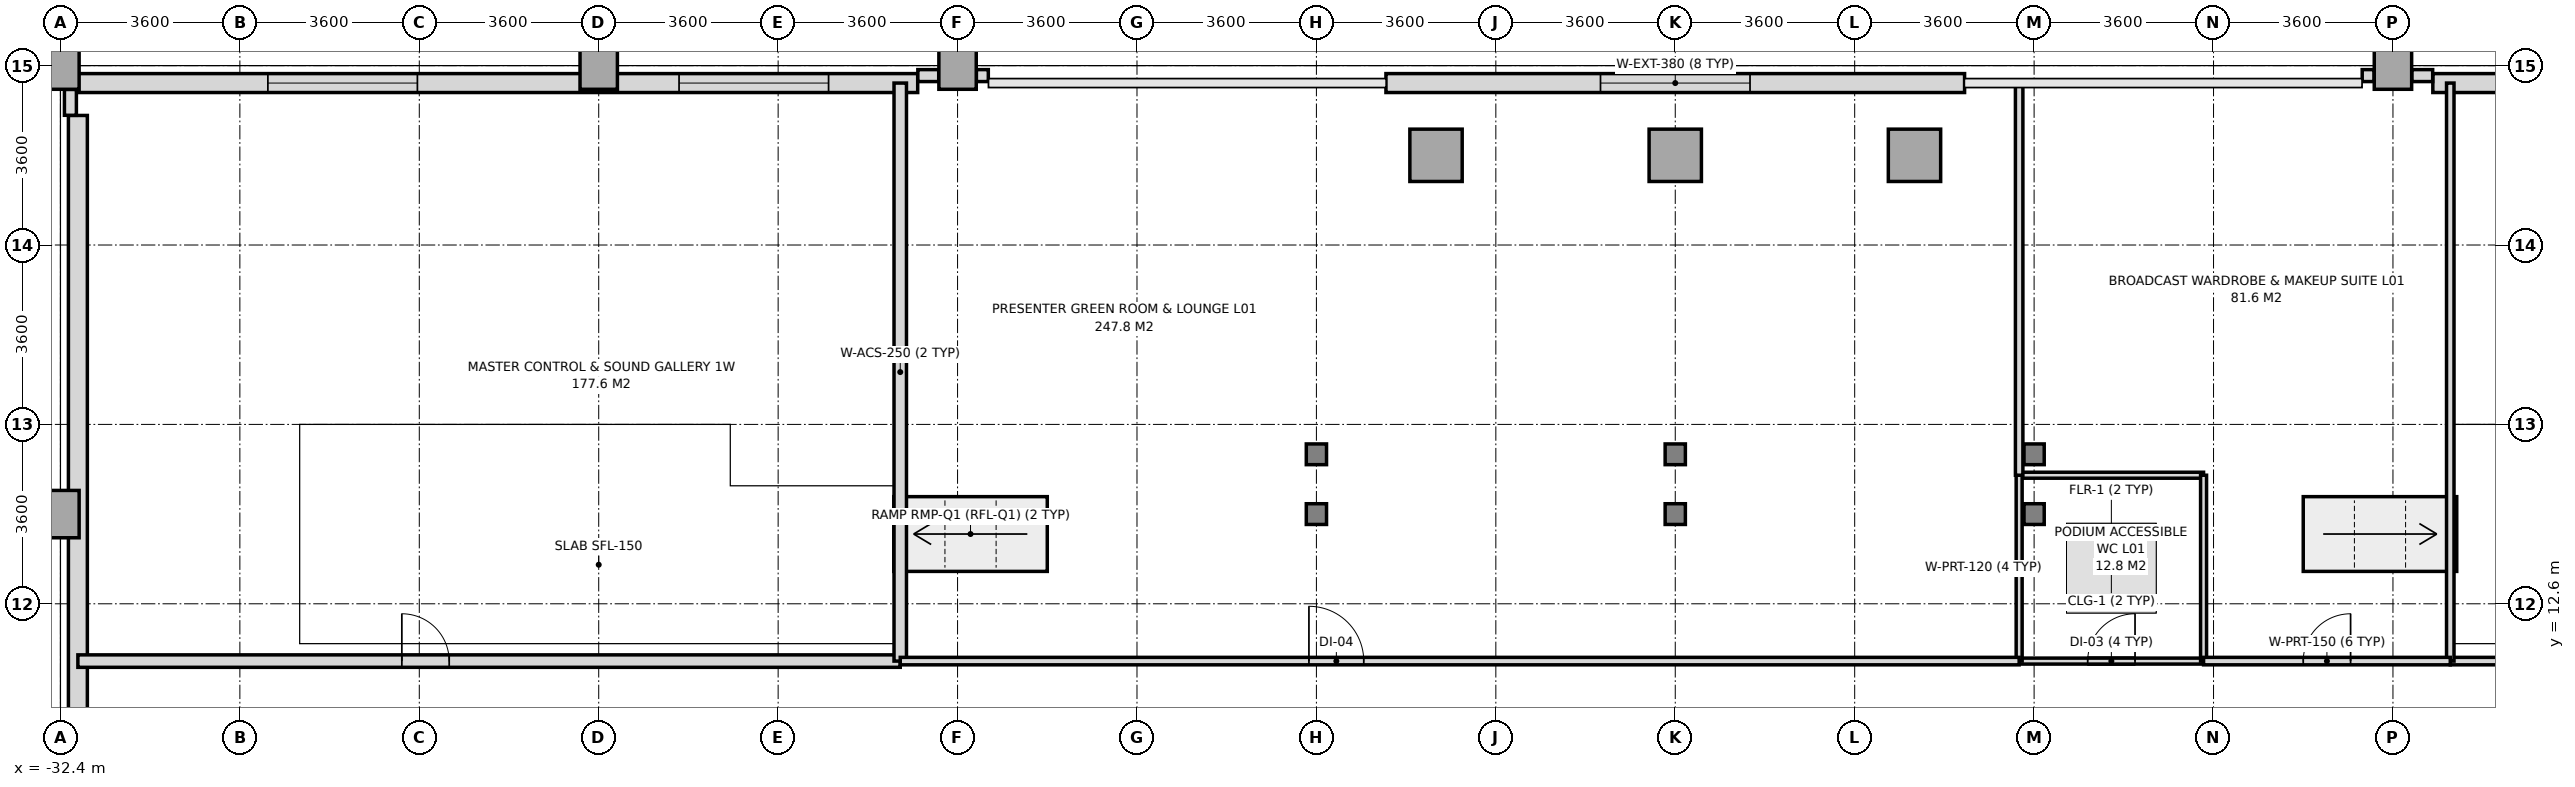
"""IFC4 building model, lengths in metres.
Left out: names, types, materials, properties, quantities, classifications, styles, units other than length and angle.
Written with IfcOpenShell. Run it as: python <this file> out.ifc"""

import sys

from ifc_helpers import new_model, si_unit, direction, frame, frame_2d, origin, origin_2d, place, context, subcontext, project, spatial, rectangle, i_section, extrude, source, transform, mapped, element, fill, save


model = new_model("IFC4")
c1 = context("Model", 3, precision=1e-05, world=origin(), true_north=direction((0.0, 1.0)))
c2 = subcontext(c1, "Body", "Model", "MODEL_VIEW")
j1 = project(units=[si_unit("LENGTHUNIT", "METRE"), si_unit("PLANEANGLEUNIT", "RADIAN")], contexts=[c1])
p1 = place(None, origin())
s1 = spatial("IfcSite", under=j1, at=p1, CompositionType="ELEMENT")
p2 = place(p1, origin())
s2 = spatial("IfcBuilding", under=s1, at=p2, CompositionType="ELEMENT")
p3 = place(p2, frame((0.0, 0.0, 5.4)))
s3 = spatial("IfcBuildingStorey", under=s2, at=p3, CompositionType="ELEMENT", Elevation=5.4)
m1 = source(origin(), c2, "Body", "SweptSolid", [
    extrude(rectangle(XDim=0.75, YDim=0.95, at=origin_2d()), origin(), (0.0, 0.0, 1.0), 4.52),
])
for number, where, z_axis, x_axis in (
    (1, (-32.4, 14.4, 0.0), (0.0, 0.0, 1.0), (1.0, 0.0, 0.0)),
    (2, (-32.4, 23.4, 0.0), (0.0, 0.0, 1.0), (1.0, 0.0, 0.0)),
    (3, (-21.6, 23.4, 0.0), (0.0, 0.0, 1.0), (1.0, 0.0, 0.0)),
    (4, (-14.4, 23.4, 0.0), (0.0, 0.0, 1.0), (1.0, 0.0, 0.0)),
):
    element("IfcColumn", number, at=place(p3, frame(where, z_axis=z_axis, x_axis=x_axis)), inside=s3, PredefinedType="COLUMN", context=c2, shape_type="MappedRepresentation", body=[
        mapped(m1, transform((0.0, 0.0, 0.0), x_axis=(1.0, 0.0, 0.0), y_axis=(0.0, 1.0, 0.0), z_axis=(0.0, 0.0, 1.0), scale=1.0)),
    ])
m2 = source(origin(), c2, "Body", "SweptSolid", [
    extrude(i_section(OverallWidth=0.406, OverallDepth=0.416, WebThickness=0.024, FlangeThickness=0.039, at=origin_2d()), origin(), (0.0, 0.0, 1.0), 4.52),
])
for number, where, z_axis, x_axis in (
    (5, (-7.2, 14.4, 0.0), (0.0, 0.0, 1.0), (1.0, 0.0, 0.0)),
    (6, (-7.2, 15.6, 0.0), (0.0, 0.0, 1.0), (1.0, 0.0, 0.0)),
):
    element("IfcColumn", number, at=place(p3, frame(where, z_axis=z_axis, x_axis=x_axis)), inside=s3, PredefinedType="COLUMN", context=c2, shape_type="MappedRepresentation", body=[
        mapped(m2, transform((0.0, 0.0, 0.0), x_axis=(1.0, 0.0, 0.0), y_axis=(0.0, 1.0, 0.0), z_axis=(0.0, 0.0, 1.0), scale=1.0)),
    ])
m3 = source(origin(), c2, "Body", "SweptSolid", [
    extrude(rectangle(XDim=1.05, YDim=1.05, at=origin_2d()), origin(), (0.0, 0.0, 1.0), 4.52),
])
p4 = place(p3, frame((-4.8, 21.6, 0.0), z_axis=(0.0, 0.0, 1.0), x_axis=(1.0, 0.0, 0.0)))
e7 = element("IfcColumn", 7, at=p4, inside=s3, PredefinedType="COLUMN", context=c2, shape_type="MappedRepresentation", body=[
    mapped(m3, transform((0.0, 0.0, 0.0), x_axis=(1.0, 0.0, 0.0), y_axis=(0.0, 1.0, 0.0), z_axis=(0.0, 0.0, 1.0), scale=1.0)),
])
for number, where, z_axis, x_axis in (
    (8, (0.0, 14.4, 0.0), (0.0, 0.0, 1.0), (1.0, 0.0, 0.0)),
    (9, (0.0, 15.6, 0.0), (0.0, 0.0, 1.0), (1.0, 0.0, 0.0)),
):
    element("IfcColumn", number, at=place(p3, frame(where, z_axis=z_axis, x_axis=x_axis)), inside=s3, PredefinedType="COLUMN", context=c2, shape_type="MappedRepresentation", body=[
        mapped(m2, transform((0.0, 0.0, 0.0), x_axis=(1.0, 0.0, 0.0), y_axis=(0.0, 1.0, 0.0), z_axis=(0.0, 0.0, 1.0), scale=1.0)),
    ])
for number, where, z_axis, x_axis in (
    (10, (0.0, 21.6, 0.0), (0.0, 0.0, 1.0), (1.0, 0.0, 0.0)),
    (11, (4.8, 21.6, 0.0), (0.0, 0.0, 1.0), (1.0, 0.0, 0.0)),
):
    element("IfcColumn", number, at=place(p3, frame(where, z_axis=z_axis, x_axis=x_axis)), inside=s3, PredefinedType="COLUMN", context=c2, shape_type="MappedRepresentation", body=[
        mapped(m3, transform((0.0, 0.0, 0.0), x_axis=(1.0, 0.0, 0.0), y_axis=(0.0, 1.0, 0.0), z_axis=(0.0, 0.0, 1.0), scale=1.0)),
    ])
for number, where, z_axis, x_axis in (
    (12, (7.2, 14.4, 0.0), (0.0, 0.0, 1.0), (1.0, 0.0, 0.0)),
    (13, (7.2, 15.6, 0.0), (0.0, 0.0, 1.0), (1.0, 0.0, 0.0)),
):
    element("IfcColumn", number, at=place(p3, frame(where, z_axis=z_axis, x_axis=x_axis)), inside=s3, PredefinedType="COLUMN", context=c2, shape_type="MappedRepresentation", body=[
        mapped(m2, transform((0.0, 0.0, 0.0), x_axis=(1.0, 0.0, 0.0), y_axis=(0.0, 1.0, 0.0), z_axis=(0.0, 0.0, 1.0), scale=1.0)),
    ])
p5 = place(p3, frame((14.4, 23.4, 0.0), z_axis=(0.0, 0.0, 1.0), x_axis=(1.0, 0.0, 0.0)))
e14 = element("IfcColumn", 14, at=p5, inside=s3, PredefinedType="COLUMN", context=c2, shape_type="MappedRepresentation", body=[
    mapped(m1, transform((0.0, 0.0, 0.0), x_axis=(1.0, 0.0, 0.0), y_axis=(0.0, 1.0, 0.0), z_axis=(0.0, 0.0, 1.0), scale=1.0)),
])
p6 = place(p3, frame((-32.05, 23.05, 0.0), z_axis=(0.0, 0.0, 1.0), x_axis=(1.0, 0.0, 0.0)))
e15 = element("IfcWall", 15, at=p6, inside=s3, PredefinedType="SOLIDWALL", context=c2, shape_type="SweptSolid", body=[
    extrude(rectangle(XDim=16.85, YDim=0.38, at=frame_2d((8.425, 0.0))), origin(), (0.0, 0.0, 1.0), 3.77),
])
p7 = place(p6, frame((3.812, 0.0, 0.95)))
e16 = element("IfcOpeningElement", 16, at=p7, cuts=e15, PredefinedType="OPENING", context=c2, shape_type="SweptSolid", body=[
    extrude(rectangle(XDim=3.0, YDim=2.4, at=frame_2d((1.5, 1.2))), frame((0.0, 0.2, 0.0), z_axis=(0.0, -1.0, 0.0), x_axis=(1.0, 0.0, 0.0)), (0.0, 0.0, 1.0), 0.4),
])
p8 = place(p6, frame((12.062, 0.0, 0.95)))
e17 = element("IfcOpeningElement", 17, at=p8, cuts=e15, PredefinedType="OPENING", context=c2, shape_type="SweptSolid", body=[
    extrude(rectangle(XDim=3.0, YDim=2.4, at=frame_2d((1.5, 1.2))), frame((0.0, 0.2, 0.0), z_axis=(0.0, -1.0, 0.0), x_axis=(1.0, 0.0, 0.0)), (0.0, 0.0, 1.0), 0.4),
])
p9 = place(p3, frame((15.2, 23.05, 0.0), z_axis=(0.0, 0.0, 1.0), x_axis=(1.0, 0.0, 0.0)))
e18 = element("IfcWall", 18, at=p9, inside=s3, PredefinedType="SOLIDWALL", context=c2, shape_type="SweptSolid", body=[
    extrude(rectangle(XDim=16.85, YDim=0.38, at=frame_2d((8.425, 0.0))), origin(), (0.0, 0.0, 1.0), 3.77),
])
p10 = place(p9, frame((1.788, 0.0, 0.95)))
e19 = element("IfcOpeningElement", 19, at=p10, cuts=e18, PredefinedType="OPENING", context=c2, shape_type="SweptSolid", body=[
    extrude(rectangle(XDim=3.0, YDim=2.4, at=frame_2d((1.5, 1.2))), frame((0.0, 0.2, 0.0), z_axis=(0.0, -1.0, 0.0), x_axis=(1.0, 0.0, 0.0)), (0.0, 0.0, 1.0), 0.4),
])
p11 = place(p9, frame((10.037, 0.0, 0.95)))
e20 = element("IfcOpeningElement", 20, at=p11, cuts=e18, PredefinedType="OPENING", context=c2, shape_type="SweptSolid", body=[
    extrude(rectangle(XDim=3.0, YDim=2.4, at=frame_2d((1.5, 1.2))), frame((0.0, 0.2, 0.0), z_axis=(0.0, -1.0, 0.0), x_axis=(1.0, 0.0, 0.0)), (0.0, 0.0, 1.0), 0.4),
])
p12 = place(p3, frame((-32.05, -18.8, 0.0), z_axis=(0.0, 0.0, 1.0), x_axis=(0.0, 1.0, 0.0)))
e21 = element("IfcWall", 21, at=p12, inside=s3, PredefinedType="SOLIDWALL", context=c2, shape_type="SweptSolid", body=[
    extrude(rectangle(XDim=41.2, YDim=0.38, at=frame_2d((20.6, 0.0))), origin(), (0.0, 0.0, 1.0), 3.77),
])
p13 = place(p12, frame((5.6, 0.0, 0.95)))
e22 = element("IfcOpeningElement", 22, at=p13, cuts=e21, PredefinedType="OPENING", context=c2, shape_type="SweptSolid", body=[
    extrude(rectangle(XDim=3.0, YDim=2.4, at=frame_2d((1.5, 1.2))), frame((0.0, 0.2, 0.0), z_axis=(0.0, -1.0, 0.0), x_axis=(1.0, 0.0, 0.0)), (0.0, 0.0, 1.0), 0.4),
])
p14 = place(p12, frame((12.8, 0.0, 0.95)))
e23 = element("IfcOpeningElement", 23, at=p14, cuts=e21, PredefinedType="OPENING", context=c2, shape_type="SweptSolid", body=[
    extrude(rectangle(XDim=3.0, YDim=2.4, at=frame_2d((1.5, 1.2))), frame((0.0, 0.2, 0.0), z_axis=(0.0, -1.0, 0.0), x_axis=(1.0, 0.0, 0.0)), (0.0, 0.0, 1.0), 0.4),
])
p15 = place(p12, frame((21.8, 0.0, 0.95)))
e24 = element("IfcOpeningElement", 24, at=p15, cuts=e21, PredefinedType="OPENING", context=c2, shape_type="SweptSolid", body=[
    extrude(rectangle(XDim=3.0, YDim=2.4, at=frame_2d((1.5, 1.2))), frame((0.0, 0.2, 0.0), z_axis=(0.0, -1.0, 0.0), x_axis=(1.0, 0.0, 0.0)), (0.0, 0.0, 1.0), 0.4),
])
p16 = place(p3, frame((-5.805, 23.05, 0.0), z_axis=(0.0, 0.0, 1.0), x_axis=(1.0, 0.0, 0.0)))
e25 = element("IfcWall", 25, at=p16, inside=s3, PredefinedType="SOLIDWALL", context=c2, shape_type="SweptSolid", body=[
    extrude(rectangle(XDim=11.61, YDim=0.38, at=frame_2d((5.805, 0.0))), origin(), (0.0, 0.0, 1.0), 4.52),
])
p17 = place(p16, frame((4.305, 0.0, 0.95)))
e26 = element("IfcOpeningElement", 26, at=p17, cuts=e25, PredefinedType="OPENING", context=c2, shape_type="SweptSolid", body=[
    extrude(rectangle(XDim=3.0, YDim=2.4, at=frame_2d((1.5, 1.2))), frame((0.0, 0.2, 0.0), z_axis=(0.0, -1.0, 0.0), x_axis=(1.0, 0.0, 0.0)), (0.0, 0.0, 1.0), 0.4),
])
p18 = place(p3, frame((-32.2, 22.403, 0.0), z_axis=(0.0, 0.0, 1.0), x_axis=(0.0, 1.0, 0.0)))
e27 = element("IfcWall", 27, at=p18, inside=s3, PredefinedType="PARAPET", context=c2, shape_type="SweptSolid", body=[
    extrude(rectangle(XDim=0.519, YDim=0.24, at=frame_2d((0.26, 0.0))), origin(), (0.0, 0.0, 1.0), 1.15),
])
p19 = place(p3, frame((-15.197, 23.2, 0.0), z_axis=(0.0, 0.0, 1.0), x_axis=(1.0, 0.0, 0.0)))
e28 = element("IfcWall", 28, at=p19, inside=s3, PredefinedType="PARAPET", context=c2, shape_type="SweptSolid", body=[
    extrude(rectangle(XDim=0.419, YDim=0.24, at=frame_2d((0.209, 0.0))), origin(), (0.0, 0.0, 1.0), 1.15),
])
for number, where, z_axis, x_axis in (
    (29, (-14.022, 23.2, 0.0), (0.0, 0.0, 1.0), (1.0, 0.0, 0.0)),
    (30, (13.783, 23.2, 0.0), (0.0, 0.0, 1.0), (1.0, 0.0, 0.0)),
):
    element("IfcWall", number, at=place(p3, frame(where, z_axis=z_axis, x_axis=x_axis)), inside=s3, PredefinedType="PARAPET", context=c2, shape_type="SweptSolid", body=[
        extrude(rectangle(XDim=0.239, YDim=0.24, at=frame_2d((0.12, 0.0))), origin(), (0.0, 0.0, 1.0), 1.15),
    ])
p20 = place(p3, frame((14.778, 23.2, 0.0), z_axis=(0.0, 0.0, 1.0), x_axis=(1.0, 0.0, 0.0)))
e31 = element("IfcWall", 31, at=p20, inside=s3, PredefinedType="PARAPET", context=c2, shape_type="SweptSolid", body=[
    extrude(rectangle(XDim=0.419, YDim=0.24, at=frame_2d((0.209, 0.0))), origin(), (0.0, 0.0, 1.0), 1.15),
])
p21 = place(p3, frame((6.9, 11.45, 0.0), z_axis=(0.0, 0.0, 1.0), x_axis=(1.0, 0.0, 0.0)))
e32 = element("IfcWall", 32, at=p21, inside=s3, PredefinedType="PARTITIONING", context=c2, shape_type="SweptSolid", body=[
    extrude(rectangle(XDim=3.7, YDim=0.12, at=frame_2d((1.85, 0.0))), origin(), (0.0, 0.0, 1.0), 4.52),
])
p22 = place(p21, frame((1.375, 0.0, 0.0)))
e33 = element("IfcOpeningElement", 33, at=p22, cuts=e32, PredefinedType="OPENING", context=c2, shape_type="SweptSolid", body=[
    extrude(rectangle(XDim=0.95, YDim=2.15, at=frame_2d((0.475, 1.075))), frame((0.0, 0.07, 0.0), z_axis=(0.0, -1.0, 0.0), x_axis=(1.0, 0.0, 0.0)), (0.0, 0.0, 1.0), 0.14),
])
p23 = place(p3, frame((6.9, 15.18, 0.0), z_axis=(0.0, 0.0, 1.0), x_axis=(1.0, 0.0, 0.0)))
e34 = element("IfcWall", 34, at=p23, inside=s3, PredefinedType="PARTITIONING", context=c2, shape_type="SweptSolid", body=[
    extrude(rectangle(XDim=3.7, YDim=0.12, at=frame_2d((1.85, 0.0))), origin(), (0.0, 0.0, 1.0), 4.52),
])
p24 = place(p3, frame((6.9, 11.45, 0.0), z_axis=(0.0, 0.0, 1.0), x_axis=(0.0, 1.0, 0.0)))
e35 = element("IfcWall", 35, at=p24, inside=s3, PredefinedType="PARTITIONING", context=c2, shape_type="SweptSolid", body=[
    extrude(rectangle(XDim=3.73, YDim=0.12, at=frame_2d((1.865, 0.0))), origin(), (0.0, 0.0, 1.0), 3.82),
])
p25 = place(p3, frame((10.6, 11.45, 0.0), z_axis=(0.0, 0.0, 1.0), x_axis=(0.0, 1.0, 0.0)))
e36 = element("IfcWall", 36, at=p25, inside=s3, PredefinedType="PARTITIONING", context=c2, shape_type="SweptSolid", body=[
    extrude(rectangle(XDim=3.73, YDim=0.12, at=frame_2d((1.865, 0.0))), origin(), (0.0, 0.0, 1.0), 4.52),
])
p26 = place(p3, frame((-32.05, 11.45, 0.0), z_axis=(0.0, 0.0, 1.0), x_axis=(1.0, 0.0, 0.0)))
e37 = element("IfcWall", 37, at=p26, inside=s3, PredefinedType="SOLIDWALL", context=c2, shape_type="SweptSolid", body=[
    extrude(rectangle(XDim=16.5, YDim=0.25, at=frame_2d((8.25, 0.0))), origin(), (0.0, 0.0, 1.0), 4.52),
])
p27 = place(p26, frame((6.5, 0.0, 0.0)))
e38 = element("IfcOpeningElement", 38, at=p27, cuts=e37, PredefinedType="OPENING", context=c2, shape_type="SweptSolid", body=[
    extrude(rectangle(XDim=0.95, YDim=2.15, at=frame_2d((0.475, 1.075))), frame((0.0, 0.135, 0.0), z_axis=(0.0, -1.0, 0.0), x_axis=(1.0, 0.0, 0.0)), (0.0, 0.0, 1.0), 0.27),
])
p28 = place(p3, frame((-15.55, 11.45, 0.0), z_axis=(0.0, 0.0, 1.0), x_axis=(0.0, 1.0, 0.0)))
e39 = element("IfcWall", 39, at=p28, inside=s3, PredefinedType="SOLIDWALL", context=c2, shape_type="SweptSolid", body=[
    extrude(rectangle(XDim=11.6, YDim=0.25, at=frame_2d((5.8, 0.0))), origin(), (0.0, 0.0, 1.0), 4.52),
])
p29 = place(p3, frame((15.55, 11.45, 0.0), z_axis=(0.0, 0.0, 1.0), x_axis=(1.0, 0.0, 0.0)))
e40 = element("IfcWall", 40, at=p29, inside=s3, PredefinedType="PARTITIONING", context=c2, shape_type="SweptSolid", body=[
    extrude(rectangle(XDim=16.5, YDim=0.15, at=frame_2d((8.25, 0.0))), origin(), (0.0, 0.0, 1.0), 4.52),
])
p30 = place(p29, frame((6.5, 0.0, 0.0)))
e41 = element("IfcOpeningElement", 41, at=p30, cuts=e40, PredefinedType="OPENING", context=c2, shape_type="SweptSolid", body=[
    extrude(rectangle(XDim=0.95, YDim=2.15, at=frame_2d((0.475, 1.075))), frame((0.0, 0.085, 0.0), z_axis=(0.0, -1.0, 0.0), x_axis=(1.0, 0.0, 0.0)), (0.0, 0.0, 1.0), 0.17),
])
p31 = place(p3, frame((15.55, 11.45, 0.0), z_axis=(0.0, 0.0, 1.0), x_axis=(0.0, 1.0, 0.0)))
e42 = element("IfcWall", 42, at=p31, inside=s3, PredefinedType="PARTITIONING", context=c2, shape_type="SweptSolid", body=[
    extrude(rectangle(XDim=11.6, YDim=0.15, at=frame_2d((5.8, 0.0))), origin(), (0.0, 0.0, 1.0), 4.52),
])
p32 = place(p3, frame((-15.55, 11.45, 0.0), z_axis=(0.0, 0.0, 1.0), x_axis=(1.0, 0.0, 0.0)))
e43 = element("IfcWall", 43, at=p32, inside=s3, PredefinedType="PARTITIONING", context=c2, shape_type="SweptSolid", body=[
    extrude(rectangle(XDim=22.45, YDim=0.15, at=frame_2d((11.225, 0.0))), origin(), (0.0, 0.0, 1.0), 3.92),
])
p33 = place(p32, frame((8.2, 0.0, 0.0)))
e44 = element("IfcOpeningElement", 44, at=p33, cuts=e43, PredefinedType="OPENING", context=c2, shape_type="SweptSolid", body=[
    extrude(rectangle(XDim=1.1, YDim=2.2, at=frame_2d((0.55, 1.1))), frame((0.0, 0.085, 0.0), z_axis=(0.0, -1.0, 0.0), x_axis=(1.0, 0.0, 0.0)), (0.0, 0.0, 1.0), 0.17),
])
p34 = place(p3, frame((6.9, 15.18, 0.0), z_axis=(0.0, 0.0, 1.0), x_axis=(0.0, 1.0, 0.0)))
e45 = element("IfcWall", 45, at=p34, inside=s3, PredefinedType="PARTITIONING", context=c2, shape_type="SweptSolid", body=[
    extrude(rectangle(XDim=7.87, YDim=0.15, at=frame_2d((3.935, 0.0))), origin(), (0.0, 0.0, 1.0), 3.82),
])
p35 = place(p3, frame((10.6, 11.45, 0.0), z_axis=(0.0, 0.0, 1.0), x_axis=(1.0, 0.0, 0.0)))
e46 = element("IfcWall", 46, at=p35, inside=s3, PredefinedType="PARTITIONING", context=c2, shape_type="SweptSolid", body=[
    extrude(rectangle(XDim=4.95, YDim=0.15, at=frame_2d((2.475, 0.0))), origin(), (0.0, 0.0, 1.0), 3.92),
])
p36 = place(p35, frame((2.0, 0.0, 0.0)))
e47 = element("IfcOpeningElement", 47, at=p36, cuts=e46, PredefinedType="OPENING", context=c2, shape_type="SweptSolid", body=[
    extrude(rectangle(XDim=0.95, YDim=2.15, at=frame_2d((0.475, 1.075))), frame((0.0, 0.085, 0.0), z_axis=(0.0, -1.0, 0.0), x_axis=(1.0, 0.0, 0.0)), (0.0, 0.0, 1.0), 0.17),
])
m4 = source(origin(), c2, "Body", "SweptSolid", [
    extrude(rectangle(XDim=3.0, YDim=2.4, at=frame_2d((1.5, 1.2))), frame((0.0, 0.03, 0.0), z_axis=(0.0, -1.0, 0.0), x_axis=(1.0, 0.0, 0.0)), (0.0, 0.0, 1.0), 0.06),
])
p37 = place(p7, origin())
e48 = element("IfcWindow", 48, at=p37, inside=s3, PartitioningType="SINGLE_PANEL", PredefinedType="WINDOW", context=c2, shape_type="MappedRepresentation", body=[
    mapped(m4, transform((0.0, 0.0, 0.0), x_axis=(1.0, 0.0, 0.0), y_axis=(0.0, 1.0, 0.0), z_axis=(0.0, 0.0, 1.0), scale=1.0)),
])
fill(e16, e48)
p38 = place(p8, origin())
e49 = element("IfcWindow", 49, at=p38, inside=s3, PartitioningType="SINGLE_PANEL", PredefinedType="WINDOW", context=c2, shape_type="MappedRepresentation", body=[
    mapped(m4, transform((0.0, 0.0, 0.0), x_axis=(1.0, 0.0, 0.0), y_axis=(0.0, 1.0, 0.0), z_axis=(0.0, 0.0, 1.0), scale=1.0)),
])
fill(e17, e49)
p39 = place(p17, origin())
e50 = element("IfcWindow", 50, at=p39, inside=s3, PartitioningType="SINGLE_PANEL", PredefinedType="WINDOW", context=c2, shape_type="MappedRepresentation", body=[
    mapped(m4, transform((0.0, 0.0, 0.0), x_axis=(1.0, 0.0, 0.0), y_axis=(0.0, 1.0, 0.0), z_axis=(0.0, 0.0, 1.0), scale=1.0)),
])
fill(e26, e50)
m5 = source(origin(), c2, "Body", "SweptSolid", [
    extrude(rectangle(XDim=0.95, YDim=2.15, at=frame_2d((0.475, 1.075))), frame((0.0, 0.025, 0.0), z_axis=(0.0, -1.0, 0.0), x_axis=(1.0, 0.0, 0.0)), (0.0, 0.0, 1.0), 0.05),
])
p40 = place(p22, origin())
e51 = element("IfcDoor", 51, at=p40, inside=s3, OperationType="SINGLE_SWING_RIGHT", PredefinedType="DOOR", context=c2, shape_type="MappedRepresentation", body=[
    mapped(m5, transform((0.0, 0.0, 0.0), x_axis=(1.0, 0.0, 0.0), y_axis=(0.0, 1.0, 0.0), z_axis=(0.0, 0.0, 1.0), scale=1.0)),
])
fill(e33, e51)
p41 = place(p27, origin())
e52 = element("IfcDoor", 52, at=p41, inside=s3, OperationType="SINGLE_SWING_LEFT", PredefinedType="DOOR", context=c2, shape_type="MappedRepresentation", body=[
    mapped(m5, transform((0.0, 0.0, 0.0), x_axis=(1.0, 0.0, 0.0), y_axis=(0.0, 1.0, 0.0), z_axis=(0.0, 0.0, 1.0), scale=1.0)),
])
fill(e38, e52)
m6 = source(origin(), c2, "Body", "SweptSolid", [
    extrude(rectangle(XDim=1.1, YDim=2.2, at=frame_2d((0.55, 1.1))), frame((0.0, 0.025, 0.0), z_axis=(0.0, -1.0, 0.0), x_axis=(1.0, 0.0, 0.0)), (0.0, 0.0, 1.0), 0.05),
])
p42 = place(p33, origin())
e53 = element("IfcDoor", 53, at=p42, inside=s3, OperationType="SINGLE_SWING_LEFT", PredefinedType="DOOR", context=c2, shape_type="MappedRepresentation", body=[
    mapped(m6, transform((0.0, 0.0, 0.0), x_axis=(1.0, 0.0, 0.0), y_axis=(0.0, 1.0, 0.0), z_axis=(0.0, 0.0, 1.0), scale=1.0)),
])
fill(e44, e53)
p43 = place(p36, origin())
e54 = element("IfcDoor", 54, at=p43, inside=s3, OperationType="SINGLE_SWING_RIGHT", PredefinedType="DOOR", context=c2, shape_type="MappedRepresentation", body=[
    mapped(m5, transform((0.0, 0.0, 0.0), x_axis=(1.0, 0.0, 0.0), y_axis=(0.0, 1.0, 0.0), z_axis=(0.0, 0.0, 1.0), scale=1.0)),
])
fill(e47, e54)
save(model, sys.argv[1])
